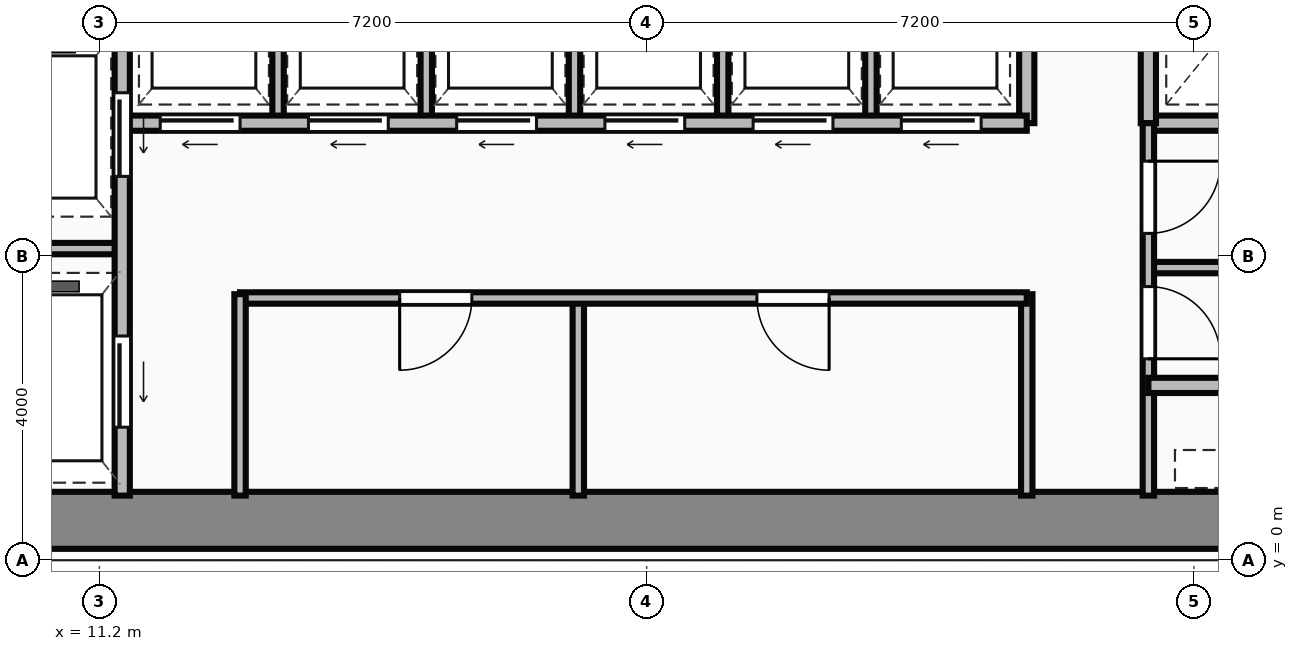
"""IFC4 building model, lengths in metres.
Left out: names, types, materials, properties, quantities, classifications, styles, units other than length and angle.
Written with IfcOpenShell. Run it as: python <this file> out.ifc"""

import sys

from ifc_helpers import new_model, si_unit, direction, frame, frame_2d, origin, place, context, subcontext, project, spatial, rectangle, extrude, source, transform, mapped, element, fill, save


model = new_model("IFC4")
c1 = context("Model", 3, precision=1e-05, world=origin(), true_north=direction((0.0, 1.0)))
c2 = subcontext(c1, "Body", "Model", "MODEL_VIEW")
j1 = project(units=[si_unit("LENGTHUNIT", "METRE"), si_unit("PLANEANGLEUNIT", "RADIAN")], contexts=[c1])
p1 = place(None, origin())
s1 = spatial("IfcSite", under=j1, at=p1, CompositionType="ELEMENT")
p2 = place(p1, origin())
s2 = spatial("IfcBuilding", under=s1, at=p2, CompositionType="ELEMENT")
p3 = place(p2, frame((0.0, 0.0, 110.55)))
s3 = spatial("IfcBuildingStorey", under=s2, at=p3, CompositionType="ELEMENT", Elevation=110.55)
m1 = source(origin(), c2, "Body", "SweptSolid", [
    extrude(rectangle(XDim=29.5, YDim=0.75, at=frame_2d((14.75, 0.0))), origin(), (0.0, 0.0, 1.0), 3.65),
])
p4 = place(p3, frame((4.5, 0.525, 0.0), z_axis=(0.0, 0.0, 1.0), x_axis=(1.0, 0.0, 0.0)))
e1 = element("IfcWall", 1, at=p4, inside=s3, PredefinedType="SHEAR", context=c2, shape_type="MappedRepresentation", body=[
    mapped(m1, transform((0.0, 0.0, 0.0))),
])
m2 = source(origin(), c2, "Body", "SweptSolid", [
    extrude(rectangle(XDim=9.6, YDim=0.2, at=frame_2d((4.8, 0.0))), origin(), (0.0, 0.0, 1.0), 3.4),
])
p5 = place(p3, frame((11.5, 0.85, 0.0), z_axis=(0.0, 0.0, 1.0), x_axis=(0.0, 1.0, 0.0)))
e2 = element("IfcWall", 2, at=p5, inside=s3, PredefinedType="PARTITIONING", context=c2, shape_type="MappedRepresentation", body=[
    mapped(m2, transform((0.0, 0.0, 0.0))),
])
p6 = place(p5, frame((4.2, 0.0, 0.0)))
e3 = element("IfcOpeningElement", 3, at=p6, cuts=e2, PredefinedType="OPENING", context=c2, shape_type="SweptSolid", body=[
    extrude(rectangle(XDim=1.1, YDim=2.15, at=frame_2d((0.55, 1.075))), frame((0.0, 0.11, 0.0), z_axis=(0.0, -1.0, 0.0), x_axis=(1.0, 0.0, 0.0)), (0.0, 0.0, 1.0), 0.22),
])
p7 = place(p5, frame((0.9, 0.0, 0.0)))
e4 = element("IfcOpeningElement", 4, at=p7, cuts=e2, PredefinedType="OPENING", context=c2, shape_type="SweptSolid", body=[
    extrude(rectangle(XDim=1.2, YDim=2.15, at=frame_2d((0.6, 1.075))), frame((0.0, 0.11, 0.0), z_axis=(0.0, -1.0, 0.0), x_axis=(1.0, 0.0, 0.0)), (0.0, 0.0, 1.0), 0.22),
])
m3 = source(origin(), c2, "Body", "SweptSolid", [
    extrude(rectangle(XDim=2.4, YDim=0.15, at=frame_2d((1.2, 0.0))), origin(), (0.0, 0.0, 1.0), 3.4),
])
p8 = place(p3, frame((9.1, 4.1, 0.0), z_axis=(0.0, 0.0, 1.0), x_axis=(1.0, 0.0, 0.0)))
e5 = element("IfcWall", 5, at=p8, inside=s3, PredefinedType="PARTITIONING", context=c2, shape_type="MappedRepresentation", body=[
    mapped(m3, transform((0.0, 0.0, 0.0))),
])
m4 = source(origin(), c2, "Body", "SweptSolid", [
    extrude(rectangle(XDim=2.65, YDim=0.15, at=frame_2d((1.325, 0.0))), origin(), (0.0, 0.0, 1.0), 3.4),
])
p9 = place(p3, frame((13.05, 0.85, 0.0), z_axis=(0.0, 0.0, 1.0), x_axis=(0.0, 1.0, 0.0)))
e6 = element("IfcWall", 6, at=p9, inside=s3, PredefinedType="PARTITIONING", context=c2, shape_type="MappedRepresentation", body=[
    mapped(m4, transform((0.0, 0.0, 0.0))),
])
m5 = source(origin(), c2, "Body", "SweptSolid", [
    extrude(rectangle(XDim=10.35, YDim=0.15, at=frame_2d((5.175, 0.0))), origin(), (0.0, 0.0, 1.0), 3.4),
])
p10 = place(p3, frame((13.05, 3.45, 0.0), z_axis=(0.0, 0.0, 1.0), x_axis=(1.0, 0.0, 0.0)))
e7 = element("IfcWall", 7, at=p10, inside=s3, PredefinedType="PARTITIONING", context=c2, shape_type="MappedRepresentation", body=[
    mapped(m5, transform((0.0, 0.0, 0.0))),
])
p11 = place(p10, frame((2.1, 0.0, 0.0)))
e8 = element("IfcOpeningElement", 8, at=p11, cuts=e7, PredefinedType="OPENING", context=c2, shape_type="SweptSolid", body=[
    extrude(rectangle(XDim=0.95, YDim=2.15, at=frame_2d((0.475, 1.075))), frame((0.0, 0.085, 0.0), z_axis=(0.0, -1.0, 0.0), x_axis=(1.0, 0.0, 0.0)), (0.0, 0.0, 1.0), 0.17),
])
p12 = place(p10, frame((6.8, 0.0, 0.0)))
e9 = element("IfcOpeningElement", 9, at=p12, cuts=e7, PredefinedType="OPENING", context=c2, shape_type="SweptSolid", body=[
    extrude(rectangle(XDim=0.95, YDim=2.15, at=frame_2d((0.475, 1.075))), frame((0.0, 0.085, 0.0), z_axis=(0.0, -1.0, 0.0), x_axis=(1.0, 0.0, 0.0)), (0.0, 0.0, 1.0), 0.17),
])
p13 = place(p3, frame((23.4, 0.85, 0.0), z_axis=(0.0, 0.0, 1.0), x_axis=(0.0, 1.0, 0.0)))
e10 = element("IfcWall", 10, at=p13, inside=s3, PredefinedType="PARTITIONING", context=c2, shape_type="MappedRepresentation", body=[
    mapped(m4, transform((0.0, 0.0, 0.0))),
])
m6 = source(origin(), c2, "Body", "SweptSolid", [
    extrude(rectangle(XDim=2.6, YDim=0.15, at=frame_2d((1.3, 0.0))), origin(), (0.0, 0.0, 1.0), 3.4),
])
p14 = place(p3, frame((17.5, 0.85, 0.0), z_axis=(0.0, 0.0, 1.0), x_axis=(0.0, 1.0, 0.0)))
e11 = element("IfcWall", 11, at=p14, inside=s3, PredefinedType="PARTITIONING", context=c2, shape_type="MappedRepresentation", body=[
    mapped(m6, transform((0.0, 0.0, 0.0))),
])
m7 = source(origin(), c2, "Body", "SweptSolid", [
    extrude(rectangle(XDim=11.85, YDim=0.2, at=frame_2d((5.925, 0.0))), origin(), (0.0, 0.0, 1.0), 3.4),
])
p15 = place(p3, frame((11.55, 5.75, 0.0), z_axis=(0.0, 0.0, 1.0), x_axis=(1.0, 0.0, 0.0)))
e12 = element("IfcWall", 12, at=p15, inside=s3, PredefinedType="PARTITIONING", context=c2, shape_type="MappedRepresentation", body=[
    mapped(m7, transform((0.0, 0.0, 0.0))),
])
p16 = place(p15, frame((0.45, 0.0, 0.0)))
e13 = element("IfcOpeningElement", 13, at=p16, cuts=e12, PredefinedType="OPENING", context=c2, shape_type="SweptSolid", body=[
    extrude(rectangle(XDim=1.05, YDim=2.15, at=frame_2d((0.525, 1.075))), frame((0.0, 0.11, 0.0), z_axis=(0.0, -1.0, 0.0), x_axis=(1.0, 0.0, 0.0)), (0.0, 0.0, 1.0), 0.22),
])
p17 = place(p15, frame((2.4, 0.0, 0.0)))
e14 = element("IfcOpeningElement", 14, at=p17, cuts=e12, PredefinedType="OPENING", context=c2, shape_type="SweptSolid", body=[
    extrude(rectangle(XDim=1.05, YDim=2.15, at=frame_2d((0.525, 1.075))), frame((0.0, 0.11, 0.0), z_axis=(0.0, -1.0, 0.0), x_axis=(1.0, 0.0, 0.0)), (0.0, 0.0, 1.0), 0.22),
])
p18 = place(p15, frame((4.35, 0.0, 0.0)))
e15 = element("IfcOpeningElement", 15, at=p18, cuts=e12, PredefinedType="OPENING", context=c2, shape_type="SweptSolid", body=[
    extrude(rectangle(XDim=1.05, YDim=2.15, at=frame_2d((0.525, 1.075))), frame((0.0, 0.11, 0.0), z_axis=(0.0, -1.0, 0.0), x_axis=(1.0, 0.0, 0.0)), (0.0, 0.0, 1.0), 0.22),
])
p19 = place(p15, frame((6.3, 0.0, 0.0)))
e16 = element("IfcOpeningElement", 16, at=p19, cuts=e12, PredefinedType="OPENING", context=c2, shape_type="SweptSolid", body=[
    extrude(rectangle(XDim=1.05, YDim=2.15, at=frame_2d((0.525, 1.075))), frame((0.0, 0.11, 0.0), z_axis=(0.0, -1.0, 0.0), x_axis=(1.0, 0.0, 0.0)), (0.0, 0.0, 1.0), 0.22),
])
p20 = place(p15, frame((8.25, 0.0, 0.0)))
e17 = element("IfcOpeningElement", 17, at=p20, cuts=e12, PredefinedType="OPENING", context=c2, shape_type="SweptSolid", body=[
    extrude(rectangle(XDim=1.05, YDim=2.15, at=frame_2d((0.525, 1.075))), frame((0.0, 0.11, 0.0), z_axis=(0.0, -1.0, 0.0), x_axis=(1.0, 0.0, 0.0)), (0.0, 0.0, 1.0), 0.22),
])
p21 = place(p15, frame((10.2, 0.0, 0.0)))
e18 = element("IfcOpeningElement", 18, at=p21, cuts=e12, PredefinedType="OPENING", context=c2, shape_type="SweptSolid", body=[
    extrude(rectangle(XDim=1.05, YDim=2.15, at=frame_2d((0.525, 1.075))), frame((0.0, 0.11, 0.0), z_axis=(0.0, -1.0, 0.0), x_axis=(1.0, 0.0, 0.0)), (0.0, 0.0, 1.0), 0.22),
])
m8 = source(origin(), c2, "Body", "SweptSolid", [
    extrude(rectangle(XDim=2.6, YDim=0.2, at=frame_2d((1.3, 0.0))), origin(), (0.0, 0.0, 1.0), 3.4),
])
p22 = place(p3, frame((23.4, 5.75, 0.0), z_axis=(0.0, 0.0, 1.0), x_axis=(0.0, 1.0, 0.0)))
e19 = element("IfcWall", 19, at=p22, inside=s3, PredefinedType="PARTITIONING", context=c2, shape_type="MappedRepresentation", body=[
    mapped(m8, transform((0.0, 0.0, 0.0))),
])
m9 = source(origin(), c2, "Body", "SweptSolid", [
    extrude(rectangle(XDim=2.5, YDim=0.15, at=frame_2d((1.25, 0.0))), origin(), (0.0, 0.0, 1.0), 3.4),
])
for number, where, z_axis, x_axis in (
    (20, (13.55, 5.8, 0.0), (0.0, 0.0, 1.0), (0.0, 1.0, 0.0)),
    (21, (15.5, 5.8, 0.0), (0.0, 0.0, 1.0), (0.0, 1.0, 0.0)),
    (22, (17.45, 5.8, 0.0), (0.0, 0.0, 1.0), (0.0, 1.0, 0.0)),
    (23, (19.4, 5.8, 0.0), (0.0, 0.0, 1.0), (0.0, 1.0, 0.0)),
    (24, (21.35, 5.8, 0.0), (0.0, 0.0, 1.0), (0.0, 1.0, 0.0)),
):
    element("IfcWall", number, at=place(p3, frame(where, z_axis=z_axis, x_axis=x_axis)), inside=s3, PredefinedType="PARTITIONING", context=c2, shape_type="MappedRepresentation", body=[
        mapped(m9, transform((0.0, 0.0, 0.0))),
    ])
m10 = source(origin(), c2, "Body", "SweptSolid", [
    extrude(rectangle(XDim=4.55, YDim=0.2, at=frame_2d((2.275, 0.0))), origin(), (0.0, 0.0, 1.0), 3.4),
])
p23 = place(p3, frame((25.0, 5.75, 0.0), z_axis=(0.0, 0.0, 1.0), x_axis=(1.0, 0.0, 0.0)))
e25 = element("IfcWall", 25, at=p23, inside=s3, PredefinedType="PARTITIONING", context=c2, shape_type="MappedRepresentation", body=[
    mapped(m10, transform((0.0, 0.0, 0.0))),
])
p24 = place(p3, frame((25.0, 5.75, 0.0), z_axis=(0.0, 0.0, 1.0), x_axis=(0.0, 1.0, 0.0)))
e26 = element("IfcWall", 26, at=p24, inside=s3, PredefinedType="PARTITIONING", context=c2, shape_type="MappedRepresentation", body=[
    mapped(m8, transform((0.0, 0.0, 0.0))),
])
m11 = source(origin(), c2, "Body", "SweptSolid", [
    extrude(rectangle(XDim=4.9, YDim=0.15, at=frame_2d((2.45, 0.0))), origin(), (0.0, 0.0, 1.0), 3.4),
])
p25 = place(p3, frame((25.0, 0.85, 0.0), z_axis=(0.0, 0.0, 1.0), x_axis=(0.0, 1.0, 0.0)))
e27 = element("IfcWall", 27, at=p25, inside=s3, PredefinedType="PARTITIONING", context=c2, shape_type="MappedRepresentation", body=[
    mapped(m11, transform((0.0, 0.0, 0.0))),
])
p26 = place(p25, frame((1.8, 0.0, 0.0)))
e28 = element("IfcOpeningElement", 28, at=p26, cuts=e27, PredefinedType="OPENING", context=c2, shape_type="SweptSolid", body=[
    extrude(rectangle(XDim=0.95, YDim=2.15, at=frame_2d((0.475, 1.075))), frame((0.0, 0.085, 0.0), z_axis=(0.0, -1.0, 0.0), x_axis=(1.0, 0.0, 0.0)), (0.0, 0.0, 1.0), 0.17),
])
p27 = place(p25, frame((3.45, 0.0, 0.0)))
e29 = element("IfcOpeningElement", 29, at=p27, cuts=e27, PredefinedType="OPENING", context=c2, shape_type="SweptSolid", body=[
    extrude(rectangle(XDim=0.95, YDim=2.15, at=frame_2d((0.475, 1.075))), frame((0.0, 0.085, 0.0), z_axis=(0.0, -1.0, 0.0), x_axis=(1.0, 0.0, 0.0)), (0.0, 0.0, 1.0), 0.17),
])
m12 = source(origin(), c2, "Body", "SweptSolid", [
    extrude(rectangle(XDim=2.4, YDim=0.2, at=frame_2d((1.2, 0.0))), origin(), (0.0, 0.0, 1.0), 3.4),
])
p28 = place(p3, frame((25.0, 2.3, 0.0), z_axis=(0.0, 0.0, 1.0), x_axis=(1.0, 0.0, 0.0)))
e30 = element("IfcWall", 30, at=p28, inside=s3, PredefinedType="PARTITIONING", context=c2, shape_type="MappedRepresentation", body=[
    mapped(m12, transform((0.0, 0.0, 0.0))),
])
m13 = source(origin(), c2, "Body", "SweptSolid", [
    extrude(rectangle(XDim=4.55, YDim=0.15, at=frame_2d((2.275, 0.0))), origin(), (0.0, 0.0, 1.0), 3.4),
])
p29 = place(p3, frame((25.0, 3.85, 0.0), z_axis=(0.0, 0.0, 1.0), x_axis=(1.0, 0.0, 0.0)))
e31 = element("IfcWall", 31, at=p29, inside=s3, PredefinedType="PARTITIONING", context=c2, shape_type="MappedRepresentation", body=[
    mapped(m13, transform((0.0, 0.0, 0.0))),
])
m14 = source(origin(), c2, "Body", "SweptSolid", [
    extrude(rectangle(XDim=1.1, YDim=2.15, at=frame_2d((0.55, 1.075))), frame((0.0, 0.025, 0.0), z_axis=(0.0, -1.0, 0.0), x_axis=(1.0, 0.0, 0.0)), (0.0, 0.0, 1.0), 0.05),
])
p30 = place(p6, frame((1.1, 0.0, 0.0), z_axis=(0.0, 0.0, 1.0), x_axis=(-1.0, 0.0, 0.0)))
e32 = element("IfcDoor", 32, at=p30, inside=s3, OperationType="SLIDING_TO_LEFT", PredefinedType="DOOR", context=c2, shape_type="MappedRepresentation", body=[
    mapped(m14, transform((0.0, 0.0, 0.0))),
])
fill(e3, e32)
m15 = source(origin(), c2, "Body", "SweptSolid", [
    extrude(rectangle(XDim=1.2, YDim=2.15, at=frame_2d((0.6, 1.075))), frame((0.0, 0.025, 0.0), z_axis=(0.0, -1.0, 0.0), x_axis=(1.0, 0.0, 0.0)), (0.0, 0.0, 1.0), 0.05),
])
p31 = place(p7, frame((1.2, 0.0, 0.0), z_axis=(0.0, 0.0, 1.0), x_axis=(-1.0, 0.0, 0.0)))
e33 = element("IfcDoor", 33, at=p31, inside=s3, OperationType="SLIDING_TO_LEFT", PredefinedType="DOOR", context=c2, shape_type="MappedRepresentation", body=[
    mapped(m15, transform((0.0, 0.0, 0.0))),
])
fill(e4, e33)
m16 = source(origin(), c2, "Body", "SweptSolid", [
    extrude(rectangle(XDim=0.95, YDim=2.15, at=frame_2d((0.475, 1.075))), frame((0.0, 0.025, 0.0), z_axis=(0.0, -1.0, 0.0), x_axis=(1.0, 0.0, 0.0)), (0.0, 0.0, 1.0), 0.05),
])
p32 = place(p11, origin())
e34 = element("IfcDoor", 34, at=p32, inside=s3, OperationType="SINGLE_SWING_LEFT", PredefinedType="DOOR", context=c2, shape_type="MappedRepresentation", body=[
    mapped(m16, transform((0.0, 0.0, 0.0))),
])
fill(e8, e34)
p33 = place(p12, origin())
e35 = element("IfcDoor", 35, at=p33, inside=s3, OperationType="SINGLE_SWING_RIGHT", PredefinedType="DOOR", context=c2, shape_type="MappedRepresentation", body=[
    mapped(m16, transform((0.0, 0.0, 0.0))),
])
fill(e9, e35)
m17 = source(origin(), c2, "Body", "SweptSolid", [
    extrude(rectangle(XDim=1.05, YDim=2.15, at=frame_2d((0.525, 1.075))), frame((0.0, 0.025, 0.0), z_axis=(0.0, -1.0, 0.0), x_axis=(1.0, 0.0, 0.0)), (0.0, 0.0, 1.0), 0.05),
])
p34 = place(p16, frame((1.05, 0.0, 0.0), z_axis=(0.0, 0.0, 1.0), x_axis=(-1.0, 0.0, 0.0)))
e36 = element("IfcDoor", 36, at=p34, inside=s3, OperationType="SLIDING_TO_LEFT", PredefinedType="DOOR", context=c2, shape_type="MappedRepresentation", body=[
    mapped(m17, transform((0.0, 0.0, 0.0))),
])
fill(e13, e36)
p35 = place(p17, frame((1.05, 0.0, 0.0), z_axis=(0.0, 0.0, 1.0), x_axis=(-1.0, 0.0, 0.0)))
e37 = element("IfcDoor", 37, at=p35, inside=s3, OperationType="SLIDING_TO_LEFT", PredefinedType="DOOR", context=c2, shape_type="MappedRepresentation", body=[
    mapped(m17, transform((0.0, 0.0, 0.0))),
])
fill(e14, e37)
p36 = place(p18, frame((1.05, 0.0, 0.0), z_axis=(0.0, 0.0, 1.0), x_axis=(-1.0, 0.0, 0.0)))
e38 = element("IfcDoor", 38, at=p36, inside=s3, OperationType="SLIDING_TO_LEFT", PredefinedType="DOOR", context=c2, shape_type="MappedRepresentation", body=[
    mapped(m17, transform((0.0, 0.0, 0.0))),
])
fill(e15, e38)
p37 = place(p19, frame((1.05, 0.0, 0.0), z_axis=(0.0, 0.0, 1.0), x_axis=(-1.0, 0.0, 0.0)))
e39 = element("IfcDoor", 39, at=p37, inside=s3, OperationType="SLIDING_TO_LEFT", PredefinedType="DOOR", context=c2, shape_type="MappedRepresentation", body=[
    mapped(m17, transform((0.0, 0.0, 0.0))),
])
fill(e16, e39)
p38 = place(p20, frame((1.05, 0.0, 0.0), z_axis=(0.0, 0.0, 1.0), x_axis=(-1.0, 0.0, 0.0)))
e40 = element("IfcDoor", 40, at=p38, inside=s3, OperationType="SLIDING_TO_LEFT", PredefinedType="DOOR", context=c2, shape_type="MappedRepresentation", body=[
    mapped(m17, transform((0.0, 0.0, 0.0))),
])
fill(e17, e40)
p39 = place(p21, frame((1.05, 0.0, 0.0), z_axis=(0.0, 0.0, 1.0), x_axis=(-1.0, 0.0, 0.0)))
e41 = element("IfcDoor", 41, at=p39, inside=s3, OperationType="SLIDING_TO_LEFT", PredefinedType="DOOR", context=c2, shape_type="MappedRepresentation", body=[
    mapped(m17, transform((0.0, 0.0, 0.0))),
])
fill(e18, e41)
p40 = place(p26, origin())
e42 = element("IfcDoor", 42, at=p40, inside=s3, OperationType="SINGLE_SWING_LEFT", PredefinedType="DOOR", context=c2, shape_type="MappedRepresentation", body=[
    mapped(m16, transform((0.0, 0.0, 0.0))),
])
fill(e28, e42)
p41 = place(p27, origin())
e43 = element("IfcDoor", 43, at=p41, inside=s3, OperationType="SINGLE_SWING_RIGHT", PredefinedType="DOOR", context=c2, shape_type="MappedRepresentation", body=[
    mapped(m16, transform((0.0, 0.0, 0.0))),
])
fill(e29, e43)
save(model, sys.argv[1])
